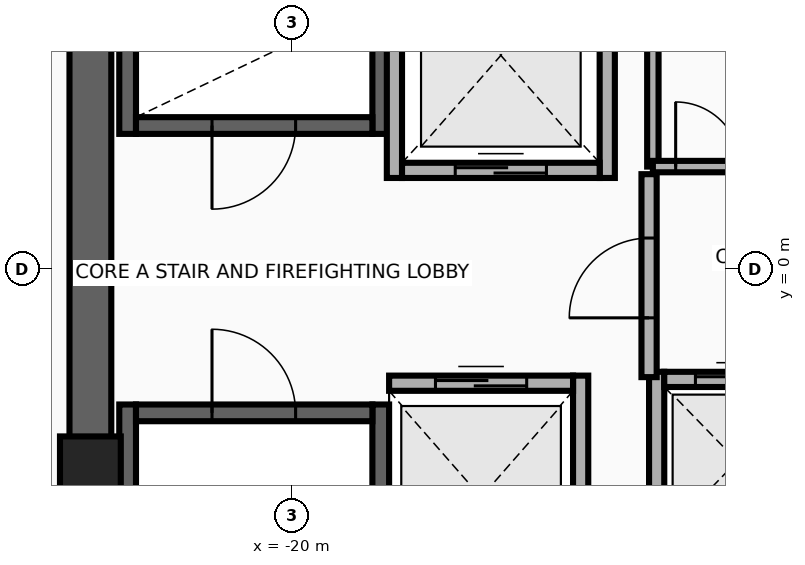
"""IFC4 building model, lengths in metres.
Left out: names, types, materials, properties, quantities, classifications, styles, units other than length and angle.
Written with IfcOpenShell. Run it as: python <this file> out.ifc"""

import sys

from ifc_helpers import new_model, si_unit, direction, frame, frame_2d, origin, origin_2d, place, context, subcontext, project, spatial, rectangle, extrude, source, transform, mapped, element, fill, save


model = new_model("IFC4")
c1 = context("Model", 3, precision=1e-05, world=origin(), true_north=direction((0.0, 1.0)))
c2 = subcontext(c1, "Body", "Model", "MODEL_VIEW")
j1 = project(units=[si_unit("LENGTHUNIT", "METRE"), si_unit("PLANEANGLEUNIT", "RADIAN")], contexts=[c1])
p1 = place(None, origin())
s1 = spatial("IfcSite", under=j1, at=p1, CompositionType="ELEMENT")
p2 = place(p1, origin())
s2 = spatial("IfcBuilding", under=s1, at=p2, CompositionType="ELEMENT")
p3 = place(p2, frame((0.0, 0.0, 247.5)))
s3 = spatial("IfcBuildingStorey", under=s2, at=p3, CompositionType="ELEMENT", Elevation=247.5)
for number, where, z_axis, x_axis in (
    (1, (-22.16, 1.78, 0.0), (0.0, 0.0, 1.0), (0.0, 1.0, 0.0)),
    (2, (-18.83, 1.78, 0.0), (0.0, 0.0, 1.0), (0.0, 1.0, 0.0)),
):
    element("IfcWall", number, at=place(p3, frame(where, z_axis=z_axis, x_axis=x_axis)), inside=s3, PredefinedType="SHEAR", context=c2, shape_type="SweptSolid", body=[
        extrude(rectangle(XDim=8.745, YDim=0.22, at=frame_2d((4.373, 0.0))), origin(), (0.0, 0.0, 1.0), 3.26),
    ])
p4 = place(p3, frame((-22.05, 1.89, 0.0), z_axis=(0.0, 0.0, 1.0), x_axis=(1.0, 0.0, 0.0)))
e3 = element("IfcWall", 3, at=p4, inside=s3, PredefinedType="SHEAR", context=c2, shape_type="SweptSolid", body=[
    extrude(rectangle(XDim=3.11, YDim=0.22, at=frame_2d((1.555, 0.0))), origin(), (0.0, 0.0, 1.0), 3.26),
])
p5 = place(p4, frame((1.0, 0.0, 0.0)))
e4 = element("IfcOpeningElement", 4, at=p5, cuts=e3, PredefinedType="OPENING", context=c2, shape_type="SweptSolid", body=[
    extrude(rectangle(XDim=1.1, YDim=2.15, at=frame_2d((0.55, 1.075))), frame((0.0, 0.125, 0.0), z_axis=(0.0, -1.0, 0.0), x_axis=(1.0, 0.0, 0.0)), (0.0, 0.0, 1.0), 0.25),
])
for number, where, z_axis, x_axis in (
    (5, (-22.16, -10.525, 0.0), (0.0, 0.0, 1.0), (0.0, 1.0, 0.0)),
    (6, (-18.83, -10.525, 0.0), (0.0, 0.0, 1.0), (0.0, 1.0, 0.0)),
):
    element("IfcWall", number, at=place(p3, frame(where, z_axis=z_axis, x_axis=x_axis)), inside=s3, PredefinedType="SHEAR", context=c2, shape_type="SweptSolid", body=[
        extrude(rectangle(XDim=8.745, YDim=0.22, at=frame_2d((4.373, 0.0))), origin(), (0.0, 0.0, 1.0), 3.26),
    ])
p6 = place(p3, frame((-22.05, -1.89, 0.0), z_axis=(0.0, 0.0, 1.0), x_axis=(1.0, 0.0, 0.0)))
e7 = element("IfcWall", 7, at=p6, inside=s3, PredefinedType="SHEAR", context=c2, shape_type="SweptSolid", body=[
    extrude(rectangle(XDim=3.11, YDim=0.22, at=frame_2d((1.555, 0.0))), origin(), (0.0, 0.0, 1.0), 3.26),
])
p7 = place(p6, frame((1.0, 0.0, 0.0)))
e8 = element("IfcOpeningElement", 8, at=p7, cuts=e7, PredefinedType="OPENING", context=c2, shape_type="SweptSolid", body=[
    extrude(rectangle(XDim=1.1, YDim=2.15, at=frame_2d((0.55, 1.075))), frame((0.0, 0.125, 0.0), z_axis=(0.0, -1.0, 0.0), x_axis=(1.0, 0.0, 0.0)), (0.0, 0.0, 1.0), 0.25),
])
p8 = place(p3, frame((-22.65, -11.075, 0.0), z_axis=(0.0, 0.0, 1.0), x_axis=(0.0, 1.0, 0.0)))
e9 = element("IfcWall", 9, at=p8, inside=s3, PredefinedType="SHEAR", context=c2, shape_type="SweptSolid", body=[
    extrude(rectangle(XDim=22.15, YDim=0.55, at=frame_2d((11.075, 0.0))), origin(), (0.0, 0.0, 1.0), 3.26),
])
m1 = source(origin(), c2, "Body", "SweptSolid", [
    extrude(rectangle(XDim=0.8, YDim=0.8, at=origin_2d()), origin(), (0.0, 0.0, 1.0), 3.5),
])
p9 = place(p3, frame((-22.65, -2.6, 0.0), z_axis=(0.0, 0.0, 1.0), x_axis=(1.0, 0.0, 0.0)))
e10 = element("IfcColumn", 10, at=p9, inside=s3, PredefinedType="COLUMN", context=c2, shape_type="MappedRepresentation", body=[
    mapped(m1, transform((0.0, 0.0, 0.0), x_axis=(1.0, 0.0, 0.0), y_axis=(0.0, 1.0, 0.0), z_axis=(0.0, 0.0, 1.0), scale=1.0)),
])
for number, where, z_axis, x_axis in (
    (11, (-18.65, 1.2, 0.0), (0.0, 0.0, 1.0), (0.0, 1.0, 0.0)),
    (12, (-15.85, 1.2, 0.0), (0.0, 0.0, 1.0), (0.0, 1.0, 0.0)),
):
    element("IfcWall", number, at=place(p3, frame(where, z_axis=z_axis, x_axis=x_axis)), inside=s3, PredefinedType="MOVABLE", context=c2, shape_type="SweptSolid", body=[
        extrude(rectangle(XDim=3.225, YDim=0.2, at=frame_2d((1.613, 0.0))), origin(), (0.0, 0.0, 1.0), 3.26),
    ])
p10 = place(p3, frame((-18.55, 1.3, 0.0), z_axis=(0.0, 0.0, 1.0), x_axis=(1.0, 0.0, 0.0)))
e13 = element("IfcWall", 13, at=p10, inside=s3, PredefinedType="MOVABLE", context=c2, shape_type="SweptSolid", body=[
    extrude(rectangle(XDim=2.6, YDim=0.2, at=frame_2d((1.3, 0.0))), origin(), (0.0, 0.0, 1.0), 3.26),
])
p11 = place(p10, frame((0.7, 0.0, 0.0)))
e14 = element("IfcOpeningElement", 14, at=p11, cuts=e13, PredefinedType="OPENING", context=c2, shape_type="SweptSolid", body=[
    extrude(rectangle(XDim=1.2, YDim=2.1, at=frame_2d((0.6, 1.05))), frame((0.0, 0.115, 0.0), z_axis=(0.0, -1.0, 0.0), x_axis=(1.0, 0.0, 0.0)), (0.0, 0.0, 1.0), 0.23),
])
p12 = place(p3, frame((-16.2, -4.6, 0.0), z_axis=(0.0, 0.0, 1.0), x_axis=(0.0, 1.0, 0.0)))
e15 = element("IfcWall", 15, at=p12, inside=s3, PredefinedType="MOVABLE", context=c2, shape_type="SweptSolid", body=[
    extrude(rectangle(XDim=3.2, YDim=0.2, at=frame_2d((1.6, 0.0))), origin(), (0.0, 0.0, 1.0), 3.26),
])
p13 = place(p3, frame((-18.72, -1.5, 0.0), z_axis=(0.0, 0.0, 1.0), x_axis=(1.0, 0.0, 0.0)))
e16 = element("IfcWall", 16, at=p13, inside=s3, PredefinedType="MOVABLE", context=c2, shape_type="SweptSolid", body=[
    extrude(rectangle(XDim=2.42, YDim=0.2, at=frame_2d((1.21, 0.0))), origin(), (0.0, 0.0, 1.0), 3.26),
])
p14 = place(p13, frame((0.61, 0.0, 0.0)))
e17 = element("IfcOpeningElement", 17, at=p14, cuts=e16, PredefinedType="OPENING", context=c2, shape_type="SweptSolid", body=[
    extrude(rectangle(XDim=1.2, YDim=2.1, at=frame_2d((0.6, 1.05))), frame((0.0, 0.115, 0.0), z_axis=(0.0, -1.0, 0.0), x_axis=(1.0, 0.0, 0.0)), (0.0, 0.0, 1.0), 0.23),
])
p15 = place(p3, frame((-15.2, -3.7, 0.0), z_axis=(0.0, 0.0, 1.0), x_axis=(0.0, 1.0, 0.0)))
e18 = element("IfcWall", 18, at=p15, inside=s3, PredefinedType="MOVABLE", context=c2, shape_type="SweptSolid", body=[
    extrude(rectangle(XDim=2.35, YDim=0.2, at=frame_2d((1.175, 0.0))), origin(), (0.0, 0.0, 1.0), 3.26),
])
p16 = place(p3, frame((-15.1, -1.45, 0.0), z_axis=(0.0, 0.0, 1.0), x_axis=(1.0, 0.0, 0.0)))
e19 = element("IfcWall", 19, at=p16, inside=s3, PredefinedType="MOVABLE", context=c2, shape_type="SweptSolid", body=[
    extrude(rectangle(XDim=1.92, YDim=0.2, at=frame_2d((0.96, 0.0))), origin(), (0.0, 0.0, 1.0), 3.26),
])
p17 = place(p16, frame((0.41, 0.0, 0.0)))
e20 = element("IfcOpeningElement", 20, at=p17, cuts=e19, PredefinedType="OPENING", context=c2, shape_type="SweptSolid", body=[
    extrude(rectangle(XDim=1.1, YDim=2.1, at=frame_2d((0.55, 1.05))), frame((0.0, 0.115, 0.0), z_axis=(0.0, -1.0, 0.0), x_axis=(1.0, 0.0, 0.0)), (0.0, 0.0, 1.0), 0.23),
])
p18 = place(p3, frame((-15.3, -1.42, 0.0), z_axis=(0.0, 0.0, 1.0), x_axis=(0.0, 1.0, 0.0)))
e21 = element("IfcWall", 21, at=p18, inside=s3, PredefinedType="PARTITIONING", context=c2, shape_type="SweptSolid", body=[
    extrude(rectangle(XDim=2.67, YDim=0.2, at=frame_2d((1.335, 0.0))), origin(), (0.0, 0.0, 1.0), 3.26),
])
p19 = place(p18, frame((0.78, 0.0, 0.0)))
e22 = element("IfcOpeningElement", 22, at=p19, cuts=e21, PredefinedType="OPENING", context=c2, shape_type="SweptSolid", body=[
    extrude(rectangle(XDim=1.05, YDim=2.15, at=frame_2d((0.525, 1.075))), frame((0.0, 0.115, 0.0), z_axis=(0.0, -1.0, 0.0), x_axis=(1.0, 0.0, 0.0)), (0.0, 0.0, 1.0), 0.23),
])
p20 = place(p3, frame((-15.25, 1.35, 0.0), z_axis=(0.0, 0.0, 1.0), x_axis=(0.0, 1.0, 0.0)))
e23 = element("IfcWall", 23, at=p20, inside=s3, PredefinedType="PARTITIONING", context=c2, shape_type="SweptSolid", body=[
    extrude(rectangle(XDim=1.95, YDim=0.15, at=frame_2d((0.975, 0.0))), origin(), (0.0, 0.0, 1.0), 3.26),
])
p21 = place(p3, frame((-15.25, 1.35, 0.0), z_axis=(0.0, 0.0, 1.0), x_axis=(1.0, 0.0, 0.0)))
e24 = element("IfcWall", 24, at=p21, inside=s3, PredefinedType="PARTITIONING", context=c2, shape_type="SweptSolid", body=[
    extrude(rectangle(XDim=2.1, YDim=0.15, at=frame_2d((1.05, 0.0))), origin(), (0.0, 0.0, 1.0), 3.26),
])
p22 = place(p21, frame((0.3, 0.0, 0.0)))
e25 = element("IfcOpeningElement", 25, at=p22, cuts=e24, PredefinedType="OPENING", context=c2, shape_type="SweptSolid", body=[
    extrude(rectangle(XDim=0.85, YDim=2.05, at=frame_2d((0.425, 1.025))), frame((0.0, 0.09, 0.0), z_axis=(0.0, -1.0, 0.0), x_axis=(1.0, 0.0, 0.0)), (0.0, 0.0, 1.0), 0.18),
])
p23 = place(p11, origin())
e26 = element("IfcDoor", 26, at=p23, inside=s3, OperationType="DOUBLE_DOOR_SLIDING", PredefinedType="DOOR", context=c2, shape_type="SweptSolid", body=[
    extrude(rectangle(XDim=1.2, YDim=2.1, at=frame_2d((0.6, 1.05))), frame((0.0, 0.025, 0.0), z_axis=(0.0, -1.0, 0.0), x_axis=(1.0, 0.0, 0.0)), (0.0, 0.0, 1.0), 0.05),
])
fill(e14, e26)
p24 = place(p14, origin())
e27 = element("IfcDoor", 27, at=p24, inside=s3, OperationType="DOUBLE_DOOR_SLIDING", PredefinedType="DOOR", context=c2, shape_type="SweptSolid", body=[
    extrude(rectangle(XDim=1.2, YDim=2.1, at=frame_2d((0.6, 1.05))), frame((0.0, 0.025, 0.0), z_axis=(0.0, -1.0, 0.0), x_axis=(1.0, 0.0, 0.0)), (0.0, 0.0, 1.0), 0.05),
])
fill(e17, e27)
p25 = place(p17, origin())
e28 = element("IfcDoor", 28, at=p25, inside=s3, OperationType="DOUBLE_DOOR_SLIDING", PredefinedType="DOOR", context=c2, shape_type="SweptSolid", body=[
    extrude(rectangle(XDim=1.1, YDim=2.1, at=frame_2d((0.55, 1.05))), frame((0.0, 0.025, 0.0), z_axis=(0.0, -1.0, 0.0), x_axis=(1.0, 0.0, 0.0)), (0.0, 0.0, 1.0), 0.05),
])
fill(e20, e28)
p26 = place(p19, origin())
e29 = element("IfcDoor", 29, at=p26, inside=s3, OperationType="SINGLE_SWING_RIGHT", PredefinedType="DOOR", context=c2, shape_type="SweptSolid", body=[
    extrude(rectangle(XDim=1.05, YDim=2.15, at=frame_2d((0.525, 1.075))), frame((0.0, 0.025, 0.0), z_axis=(0.0, -1.0, 0.0), x_axis=(1.0, 0.0, 0.0)), (0.0, 0.0, 1.0), 0.05),
])
fill(e22, e29)
p27 = place(p5, frame((1.1, 0.0, 0.0), z_axis=(0.0, 0.0, 1.0), x_axis=(-1.0, 0.0, 0.0)))
e30 = element("IfcDoor", 30, at=p27, inside=s3, OperationType="SINGLE_SWING_LEFT", PredefinedType="DOOR", context=c2, shape_type="SweptSolid", body=[
    extrude(rectangle(XDim=1.1, YDim=2.15, at=frame_2d((0.55, 1.075))), frame((0.0, 0.025, 0.0), z_axis=(0.0, -1.0, 0.0), x_axis=(1.0, 0.0, 0.0)), (0.0, 0.0, 1.0), 0.05),
])
fill(e4, e30)
p28 = place(p7, origin())
e31 = element("IfcDoor", 31, at=p28, inside=s3, OperationType="SINGLE_SWING_RIGHT", PredefinedType="DOOR", context=c2, shape_type="SweptSolid", body=[
    extrude(rectangle(XDim=1.1, YDim=2.15, at=frame_2d((0.55, 1.075))), frame((0.0, 0.025, 0.0), z_axis=(0.0, -1.0, 0.0), x_axis=(1.0, 0.0, 0.0)), (0.0, 0.0, 1.0), 0.05),
])
fill(e8, e31)
p29 = place(p22, origin())
e32 = element("IfcDoor", 32, at=p29, inside=s3, OperationType="SINGLE_SWING_LEFT", PredefinedType="DOOR", context=c2, shape_type="SweptSolid", body=[
    extrude(rectangle(XDim=0.85, YDim=2.05, at=frame_2d((0.425, 1.025))), frame((0.0, 0.025, 0.0), z_axis=(0.0, -1.0, 0.0), x_axis=(1.0, 0.0, 0.0)), (0.0, 0.0, 1.0), 0.05),
])
fill(e25, e32)
save(model, sys.argv[1])
